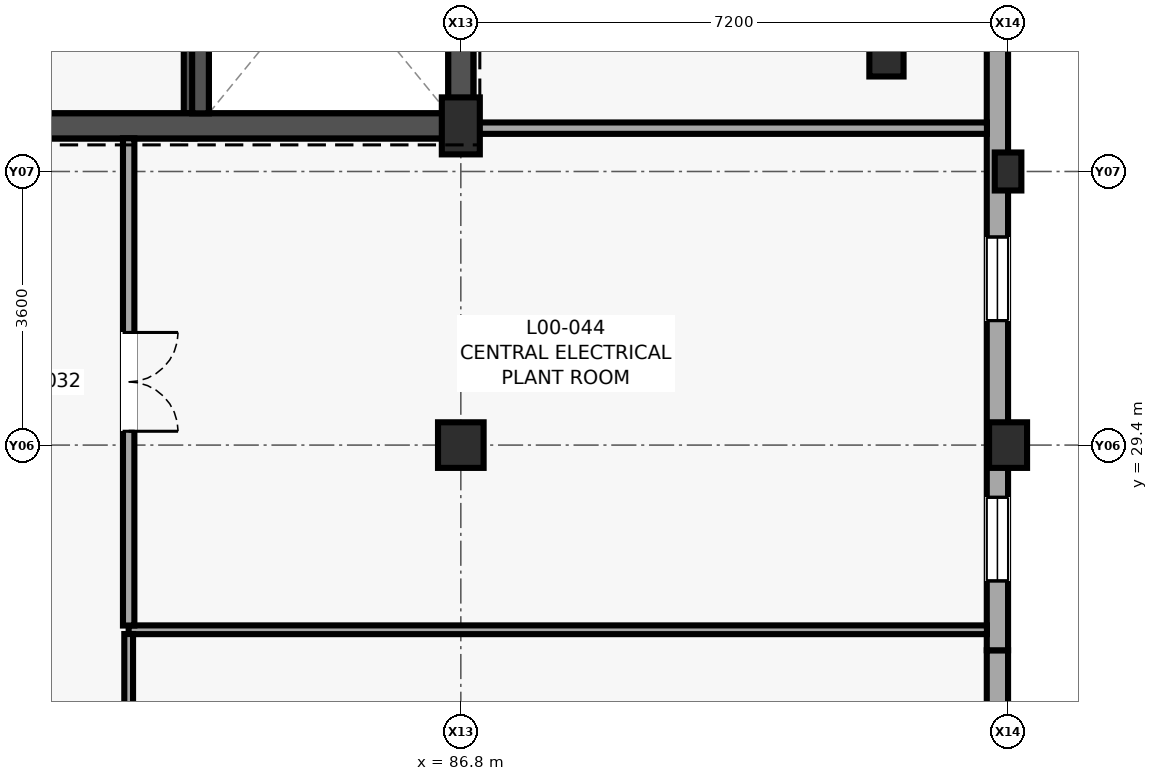
"""IFC4 building model, lengths in metres.
Left out: names, types, materials, properties, quantities, classifications, styles, units other than length and angle.
Written with IfcOpenShell. Run it as: python <this file> out.ifc"""

import sys

from ifc_helpers import new_model, si_unit, direction, frame, frame_2d, origin, origin_2d, place, context, subcontext, project, spatial, rectangle, extrude, element, fill, save


model = new_model("IFC4")
c1 = context("Model", 3, precision=1e-05, world=origin(), true_north=direction((0.0, 1.0)))
c2 = subcontext(c1, "Body", "Model", "MODEL_VIEW")
j1 = project(units=[si_unit("LENGTHUNIT", "METRE"), si_unit("PLANEANGLEUNIT", "RADIAN")], contexts=[c1])
p1 = place(None, origin())
s1 = spatial("IfcSite", under=j1, at=p1, CompositionType="ELEMENT")
p2 = place(p1, origin())
s2 = spatial("IfcBuilding", under=s1, at=p2, CompositionType="ELEMENT")
p3 = place(p2, origin())
s3 = spatial("IfcBuildingStorey", under=s2, at=p3, CompositionType="ELEMENT", Elevation=0.0)
p4 = place(p3, frame((83.155, 33.6, -1.55), z_axis=(0.0, 0.0, 1.0), x_axis=(1.0, 0.0, 0.0)))
e1 = element("IfcWall", 1, at=p4, inside=s3, PredefinedType="SHEAR", context=c2, shape_type="SweptSolid", body=[
    extrude(rectangle(XDim=3.81, YDim=0.33, at=frame_2d((1.905, 0.0))), origin(), (0.0, 0.0, 1.0), 1.3),
])
for number, where, z_axis, x_axis in (
    (2, (83.32, 33.765, -1.55), (0.0, 0.0, 1.0), (0.0, 1.0, 0.0)),
    (3, (86.8, 33.765, -1.55), (0.0, 0.0, 1.0), (0.0, 1.0, 0.0)),
):
    element("IfcWall", number, at=place(p3, frame(where, z_axis=z_axis, x_axis=x_axis)), inside=s3, PredefinedType="SHEAR", context=c2, shape_type="SweptSolid", body=[
        extrude(rectangle(XDim=3.86, YDim=0.33, at=frame_2d((1.93, 0.0))), origin(), (0.0, 0.0, 1.0), 1.3),
    ])
p5 = place(p3, frame((79.435, 33.6, -1.85), z_axis=(0.0, 0.0, 1.0), x_axis=(1.0, 0.0, 0.0)))
e4 = element("IfcWall", 4, at=p5, inside=s3, PredefinedType="SHEAR", context=c2, shape_type="SweptSolid", body=[
    extrude(rectangle(XDim=3.865, YDim=0.33, at=frame_2d((1.933, 0.0))), origin(), (0.0, 0.0, 1.0), 1.6),
])
p6 = place(p3, frame((86.8, 29.4, 0.0), z_axis=(0.0, 0.0, 1.0), x_axis=(1.0, 0.0, 0.0)))
e5 = element("IfcColumn", 5, at=p6, inside=s3, PredefinedType="COLUMN", context=c2, shape_type="SweptSolid", body=[
    extrude(rectangle(XDim=0.6, YDim=0.6, at=origin_2d()), origin(), (0.0, 0.0, 1.0), 4.2),
])
p7 = place(p3, frame((86.8, 33.6, 0.0), z_axis=(0.0, 0.0, 1.0), x_axis=(1.0, 0.0, 0.0)))
e6 = element("IfcColumn", 6, at=p7, inside=s3, PredefinedType="COLUMN", context=c2, shape_type="SweptSolid", body=[
    extrude(rectangle(XDim=0.5, YDim=0.75, at=origin_2d()), origin(), (0.0, 0.0, 1.0), 4.2),
])
p8 = place(p3, frame((92.4, 34.6, 0.0), z_axis=(0.0, 0.0, 1.0), x_axis=(1.0, 0.0, 0.0)))
e7 = element("IfcColumn", 7, at=p8, inside=s3, PredefinedType="COLUMN", context=c2, shape_type="SweptSolid", body=[
    extrude(rectangle(XDim=0.45, YDim=0.7, at=origin_2d()), origin(), (0.0, 0.0, 1.0), 4.2),
])
p9 = place(p3, frame((94.0, 29.4, 0.0), z_axis=(0.0, 0.0, 1.0), x_axis=(1.0, 0.0, 0.0)))
e8 = element("IfcColumn", 8, at=p9, inside=s3, PredefinedType="PILASTER", context=c2, shape_type="SweptSolid", body=[
    extrude(rectangle(XDim=0.5, YDim=0.6, at=origin_2d()), origin(), (0.0, 0.0, 1.0), 4.2),
])
p10 = place(p3, frame((94.0, 33.0, 0.0), z_axis=(0.0, 0.0, 1.0), x_axis=(1.0, 0.0, 0.0)))
e9 = element("IfcColumn", 9, at=p10, inside=s3, PredefinedType="PILASTER", context=c2, shape_type="SweptSolid", body=[
    extrude(rectangle(XDim=0.35, YDim=0.5, at=origin_2d()), origin(), (0.0, 0.0, 1.0), 4.2),
])
p11 = place(p3, frame((93.86, 11.4, 0.0), z_axis=(0.0, 0.0, 1.0), x_axis=(0.0, 1.0, 0.0)))
e10 = element("IfcWall", 10, at=p11, inside=s3, PredefinedType="SOLIDWALL", context=c2, shape_type="SweptSolid", body=[
    extrude(rectangle(XDim=15.3, YDim=0.28, at=frame_2d((7.65, 0.0))), origin(), (0.0, 0.0, 1.0), 3.375),
])
p12 = place(p11, frame((1.137, 0.0, 0.85)))
e11 = element("IfcOpeningElement", 11, at=p12, cuts=e10, PredefinedType="OPENING", context=c2, shape_type="SweptSolid", body=[
    extrude(rectangle(XDim=1.55, YDim=1.85, at=frame_2d((0.775, 0.925))), frame((0.0, 0.15, 0.0), z_axis=(0.0, -1.0, 0.0), x_axis=(1.0, 0.0, 0.0)), (0.0, 0.0, 1.0), 0.3),
])
p13 = place(p11, frame((4.013, 0.0, 0.75)))
e12 = element("IfcOpeningElement", 12, at=p13, cuts=e10, PredefinedType="OPENING", context=c2, shape_type="SweptSolid", body=[
    extrude(rectangle(XDim=1.75, YDim=2.05, at=frame_2d((0.875, 1.025))), frame((0.0, 0.15, 0.0), z_axis=(0.0, -1.0, 0.0), x_axis=(1.0, 0.0, 0.0)), (0.0, 0.0, 1.0), 0.3),
])
p14 = place(p11, frame((8.038, 0.0, 0.85)))
e13 = element("IfcOpeningElement", 13, at=p14, cuts=e10, PredefinedType="OPENING", context=c2, shape_type="SweptSolid", body=[
    extrude(rectangle(XDim=2.15, YDim=1.95, at=frame_2d((1.075, 0.975))), frame((0.0, 0.15, 0.0), z_axis=(0.0, -1.0, 0.0), x_axis=(1.0, 0.0, 0.0)), (0.0, 0.0, 1.0), 0.3),
])
p15 = place(p11, frame((12.487, 0.0, 0.85)))
e14 = element("IfcOpeningElement", 14, at=p15, cuts=e10, PredefinedType="OPENING", context=c2, shape_type="SweptSolid", body=[
    extrude(rectangle(XDim=1.8, YDim=1.8, at=frame_2d((0.9, 0.9))), frame((0.0, 0.15, 0.0), z_axis=(0.0, -1.0, 0.0), x_axis=(1.0, 0.0, 0.0)), (0.0, 0.0, 1.0), 0.3),
])
p16 = place(p3, frame((93.86, 26.7, 0.0), z_axis=(0.0, 0.0, 1.0), x_axis=(0.0, 1.0, 0.0)))
e15 = element("IfcWall", 15, at=p16, inside=s3, PredefinedType="SOLIDWALL", context=c2, shape_type="SweptSolid", body=[
    extrude(rectangle(XDim=15.3, YDim=0.28, at=frame_2d((7.65, 0.0))), origin(), (0.0, 0.0, 1.0), 3.375),
])
p17 = place(p16, frame((0.913, 0.0, 0.75)))
e16 = element("IfcOpeningElement", 16, at=p17, cuts=e15, PredefinedType="OPENING", context=c2, shape_type="SweptSolid", body=[
    extrude(rectangle(XDim=1.1, YDim=2.1, at=frame_2d((0.55, 1.05))), frame((0.0, 0.15, 0.0), z_axis=(0.0, -1.0, 0.0), x_axis=(1.0, 0.0, 0.0)), (0.0, 0.0, 1.0), 0.3),
])
p18 = place(p16, frame((4.338, 0.0, 0.75)))
e17 = element("IfcOpeningElement", 17, at=p18, cuts=e15, PredefinedType="OPENING", context=c2, shape_type="SweptSolid", body=[
    extrude(rectangle(XDim=1.1, YDim=2.1, at=frame_2d((0.55, 1.05))), frame((0.0, 0.15, 0.0), z_axis=(0.0, -1.0, 0.0), x_axis=(1.0, 0.0, 0.0)), (0.0, 0.0, 1.0), 0.3),
])
p19 = place(p16, frame((8.263, 0.0, 1.05)))
e18 = element("IfcOpeningElement", 18, at=p19, cuts=e15, PredefinedType="OPENING", context=c2, shape_type="SweptSolid", body=[
    extrude(rectangle(XDim=0.9, YDim=1.5, at=frame_2d((0.45, 0.75))), frame((0.0, 0.15, 0.0), z_axis=(0.0, -1.0, 0.0), x_axis=(1.0, 0.0, 0.0)), (0.0, 0.0, 1.0), 0.3),
])
p20 = place(p16, frame((12.788, 0.0, 0.85)))
e19 = element("IfcOpeningElement", 19, at=p20, cuts=e15, PredefinedType="OPENING", context=c2, shape_type="SweptSolid", body=[
    extrude(rectangle(XDim=1.2, YDim=1.65, at=frame_2d((0.6, 0.825))), frame((0.0, 0.15, 0.0), z_axis=(0.0, -1.0, 0.0), x_axis=(1.0, 0.0, 0.0)), (0.0, 0.0, 1.0), 0.3),
])
p21 = place(p3, frame((79.435, 33.6, 0.0), z_axis=(0.0, 0.0, 1.0), x_axis=(1.0, 0.0, 0.0)))
e20 = element("IfcWall", 20, at=p21, inside=s3, PredefinedType="SHEAR", context=c2, shape_type="SweptSolid", body=[
    extrude(rectangle(XDim=7.53, YDim=0.33, at=frame_2d((3.765, 0.0))), origin(), (0.0, 0.0, 1.0), 3.98),
])
p22 = place(p3, frame((86.8, 33.765, 0.0), z_axis=(0.0, 0.0, 1.0), x_axis=(0.0, 1.0, 0.0)))
e21 = element("IfcWall", 21, at=p22, inside=s3, PredefinedType="SHEAR", context=c2, shape_type="SweptSolid", body=[
    extrude(rectangle(XDim=7.47, YDim=0.33, at=frame_2d((3.735, 0.0))), origin(), (0.0, 0.0, 1.0), 3.98),
])
p23 = place(p3, frame((83.375, 33.765, 0.0), z_axis=(0.0, 0.0, 1.0), x_axis=(0.0, 1.0, 0.0)))
e22 = element("IfcWall", 22, at=p23, inside=s3, PredefinedType="SHEAR", context=c2, shape_type="SweptSolid", body=[
    extrude(rectangle(XDim=7.47, YDim=0.22, at=frame_2d((3.735, 0.0))), origin(), (0.0, 0.0, 1.0), 3.98),
])
p24 = place(p23, frame((6.12, 0.0, 0.0)))
e23 = element("IfcOpeningElement", 23, at=p24, cuts=e22, PredefinedType="OPENING", context=c2, shape_type="SweptSolid", body=[
    extrude(rectangle(XDim=1.1, YDim=2.15, at=frame_2d((0.55, 1.075))), frame((0.0, 0.12, 0.0), z_axis=(0.0, -1.0, 0.0), x_axis=(1.0, 0.0, 0.0)), (0.0, 0.0, 1.0), 0.24),
])
p25 = place(p3, frame((93.722, 26.97, 0.0), z_axis=(0.0, 0.0, 1.0), x_axis=(-1.0, 0.0, 0.0)))
e24 = element("IfcWall", 24, at=p25, inside=s3, PredefinedType="PARTITIONING", context=c2, shape_type="SweptSolid", body=[
    extrude(rectangle(XDim=11.292, YDim=0.115, at=frame_2d((5.646, 0.0))), origin(), (0.0, 0.0, 1.0), 3.975),
])
p26 = place(p3, frame((82.43, 26.914, 0.0), z_axis=(0.0, 0.0, 1.0), x_axis=(0.0, -1.0, 0.0)))
e25 = element("IfcWall", 25, at=p26, inside=s3, PredefinedType="PARTITIONING", context=c2, shape_type="SweptSolid", body=[
    extrude(rectangle(XDim=7.888, YDim=0.115, at=frame_2d((3.944, 0.0))), origin(), (0.0, 0.0, 1.0), 3.975),
])
p27 = place(p26, frame((3.469, 0.0, 0.0)))
e26 = element("IfcOpeningElement", 26, at=p27, cuts=e25, PredefinedType="OPENING", context=c2, shape_type="SweptSolid", body=[
    extrude(rectangle(XDim=0.95, YDim=2.05, at=frame_2d((0.475, 1.025))), frame((0.0, 0.067, 0.0), z_axis=(0.0, -1.0, 0.0), x_axis=(1.0, 0.0, 0.0)), (0.0, 0.0, 1.0), 0.135),
])
p28 = place(p26, frame((5.119, 0.0, 1.05)))
e27 = element("IfcOpeningElement", 27, at=p28, cuts=e25, PredefinedType="OPENING", context=c2, shape_type="SweptSolid", body=[
    extrude(rectangle(XDim=1.4, YDim=1.05, at=frame_2d((0.7, 0.525))), frame((0.0, 0.067, 0.0), z_axis=(0.0, -1.0, 0.0), x_axis=(1.0, 0.0, 0.0)), (0.0, 0.0, 1.0), 0.135),
])
p29 = place(p3, frame((82.43, 33.437, 0.0), z_axis=(0.0, 0.0, 1.0), x_axis=(0.0, -1.0, 0.0)))
e28 = element("IfcWall", 28, at=p29, inside=s3, PredefinedType="PARTITIONING", context=c2, shape_type="SweptSolid", body=[
    extrude(rectangle(XDim=6.411, YDim=0.15, at=frame_2d((3.206, 0.0))), origin(), (0.0, 0.0, 1.0), 3.975),
])
p30 = place(p29, frame((2.555, 0.0, 0.0)))
e29 = element("IfcOpeningElement", 29, at=p30, cuts=e28, PredefinedType="OPENING", context=c2, shape_type="SweptSolid", body=[
    extrude(rectangle(XDim=1.3, YDim=2.15, at=frame_2d((0.65, 1.075))), frame((0.0, 0.085, 0.0), z_axis=(0.0, -1.0, 0.0), x_axis=(1.0, 0.0, 0.0)), (0.0, 0.0, 1.0), 0.17),
])
p31 = place(p3, frame((93.722, 33.57, 0.0), z_axis=(0.0, 0.0, 1.0), x_axis=(-1.0, 0.0, 0.0)))
e30 = element("IfcWall", 30, at=p31, inside=s3, PredefinedType="PARTITIONING", context=c2, shape_type="SweptSolid", body=[
    extrude(rectangle(XDim=6.848, YDim=0.15, at=frame_2d((3.424, 0.0))), origin(), (0.0, 0.0, 1.0), 3.975),
])
p32 = place(p17, origin())
e31 = element("IfcWindow", 31, at=p32, inside=s3, PartitioningType="SINGLE_PANEL", PredefinedType="WINDOW", context=c2, shape_type="SweptSolid", body=[
    extrude(rectangle(XDim=1.1, YDim=2.1, at=frame_2d((0.55, 1.05))), frame((0.0, 0.03, 0.0), z_axis=(0.0, -1.0, 0.0), x_axis=(1.0, 0.0, 0.0)), (0.0, 0.0, 1.0), 0.06),
])
fill(e16, e31)
p33 = place(p18, origin())
e32 = element("IfcWindow", 32, at=p33, inside=s3, PartitioningType="SINGLE_PANEL", PredefinedType="WINDOW", context=c2, shape_type="SweptSolid", body=[
    extrude(rectangle(XDim=1.1, YDim=2.1, at=frame_2d((0.55, 1.05))), frame((0.0, 0.03, 0.0), z_axis=(0.0, -1.0, 0.0), x_axis=(1.0, 0.0, 0.0)), (0.0, 0.0, 1.0), 0.06),
])
fill(e17, e32)
p34 = place(p30, origin())
e33 = element("IfcDoor", 33, at=p34, inside=s3, OperationType="DOUBLE_DOOR_SINGLE_SWING", PredefinedType="DOOR", context=c2, shape_type="SweptSolid", body=[
    extrude(rectangle(XDim=1.3, YDim=2.15, at=frame_2d((0.65, 1.075))), frame((0.0, 0.025, 0.0), z_axis=(0.0, -1.0, 0.0), x_axis=(1.0, 0.0, 0.0)), (0.0, 0.0, 1.0), 0.05),
])
fill(e29, e33)
save(model, sys.argv[1])
